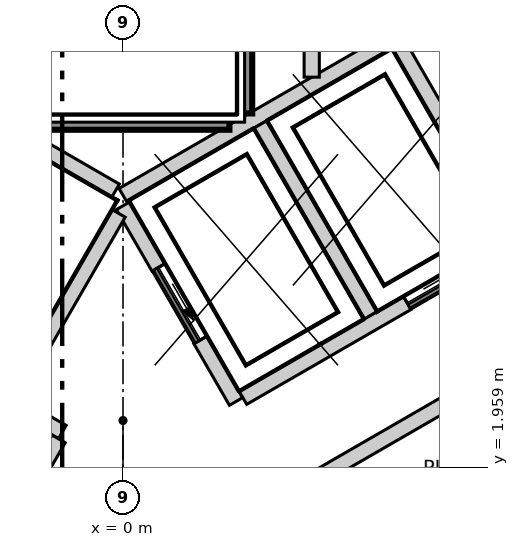
"""IFC4 building model, lengths in metres.
Left out: names, types, materials, properties, quantities, classifications, styles, units other than length and angle.
Written with IfcOpenShell. Run it as: python <this file> out.ifc"""

import sys

from ifc_helpers import new_model, si_unit, direction, frame, frame_2d, origin, place, context, subcontext, project, spatial, polyline, rectangle, outline, extrude, element, fill, save


model = new_model("IFC4")
c1 = context("Model", 3, precision=1e-05, world=origin(), true_north=direction((0.0, 1.0)))
c2 = subcontext(c1, "Body", "Model", "MODEL_VIEW")
j1 = project(units=[si_unit("LENGTHUNIT", "METRE"), si_unit("PLANEANGLEUNIT", "RADIAN")], contexts=[c1])
p1 = place(None, origin())
s1 = spatial("IfcSite", under=j1, at=p1, CompositionType="ELEMENT")
p2 = place(p1, origin())
s2 = spatial("IfcBuilding", under=s1, at=p2, CompositionType="ELEMENT")
p3 = place(p2, frame((0.0, 0.0, 268.3)))
s3 = spatial("IfcBuildingStorey", under=s2, at=p3, CompositionType="ELEMENT", Elevation=268.3)
p4 = place(p3, frame((12.384, -5.15, -0.3), z_axis=(0.0, 0.0, 1.0), x_axis=(-0.500000539815, 0.866025092122, 0.0)))
e1 = element("IfcWall", 1, at=p4, inside=s3, PredefinedType="SHEAR", context=c2, shape_type="SweptSolid", body=[
    extrude(outline(polyline([(-0.173, -0.301), (1.795, -0.301), (3.763, -0.301), (5.731, -0.301), (7.7, -0.301), (9.668, -0.301), (11.636, -0.301), (13.604, -0.3), (15.573, -0.3), (17.541, -0.3), (19.509, -0.3), (21.477, -0.3), (21.131, 0.3), (19.226, 0.3), (17.321, 0.3), (15.415, 0.3), (13.51, 0.3), (11.605, 0.3), (9.699, 0.3), (7.794, 0.3), (5.889, 0.3), (3.984, 0.3), (2.078, 0.3), (0.173, 0.3), (-0.173, -0.301)])), origin(), (0.0, 0.0, 1.0), 3.6),
])
p5 = place(p4, frame((15.627, 0.0, 0.3)))
e2 = element("IfcOpeningElement", 2, at=p5, cuts=e1, PredefinedType="OPENING", context=c2, shape_type="SweptSolid", body=[
    extrude(rectangle(XDim=0.9, YDim=2.1, at=frame_2d((0.45, 1.05))), frame((0.0, 0.31, 0.0), z_axis=(0.0, -1.0, 0.0), x_axis=(1.0, 0.0, 0.0)), (0.0, 0.0, 1.0), 0.621),
])
p6 = place(p4, frame((4.026, 0.0, 0.3)))
e3 = element("IfcOpeningElement", 3, at=p6, cuts=e1, PredefinedType="OPENING", context=c2, shape_type="SweptSolid", body=[
    extrude(rectangle(XDim=0.9, YDim=2.1, at=frame_2d((0.45, 1.05))), frame((0.0, 0.31, 0.0), z_axis=(0.0, -1.0, 0.0), x_axis=(1.0, 0.0, 0.0)), (0.0, 0.0, 1.0), 0.621),
])
p7 = place(p3, frame((26.205, -12.154, 0.0), z_axis=(0.0, 0.0, 1.0), x_axis=(-0.49999909388, 0.866025926932, 0.0)))
e4 = element("IfcWall", 4, at=p7, inside=s3, PredefinedType="ELEMENTEDWALL", context=c2, shape_type="SweptSolid", body=[
    extrude(rectangle(XDim=47.236, YDim=0.2, at=frame_2d((23.618, 0.0))), origin(), (0.0, 0.0, 1.0), 3.3),
])
p8 = place(p7, frame((2.243, 0.0, 0.9)))
e5 = element("IfcOpeningElement", 5, at=p8, cuts=e4, PredefinedType="OPENING", context=c2, shape_type="SweptSolid", body=[
    extrude(rectangle(XDim=3.7, YDim=2.2, at=frame_2d((1.85, 1.1))), frame((0.0, 0.11, 0.0), z_axis=(0.0, -1.0, 0.0), x_axis=(1.0, 0.0, 0.0)), (0.0, 0.0, 1.0), 0.22),
])
p9 = place(p7, frame((7.825, 0.0, 0.9)))
e6 = element("IfcOpeningElement", 6, at=p9, cuts=e4, PredefinedType="OPENING", context=c2, shape_type="SweptSolid", body=[
    extrude(rectangle(XDim=3.7, YDim=2.2, at=frame_2d((1.85, 1.1))), frame((0.0, 0.11, 0.0), z_axis=(0.0, -1.0, 0.0), x_axis=(1.0, 0.0, 0.0)), (0.0, 0.0, 1.0), 0.22),
])
p10 = place(p7, frame((13.406, 0.0, 0.9)))
e7 = element("IfcOpeningElement", 7, at=p10, cuts=e4, PredefinedType="OPENING", context=c2, shape_type="SweptSolid", body=[
    extrude(rectangle(XDim=3.7, YDim=2.2, at=frame_2d((1.85, 1.1))), frame((0.0, 0.11, 0.0), z_axis=(0.0, -1.0, 0.0), x_axis=(1.0, 0.0, 0.0)), (0.0, 0.0, 1.0), 0.22),
])
p11 = place(p7, frame((18.987, 0.0, 0.9)))
e8 = element("IfcOpeningElement", 8, at=p11, cuts=e4, PredefinedType="OPENING", context=c2, shape_type="SweptSolid", body=[
    extrude(rectangle(XDim=3.7, YDim=2.2, at=frame_2d((1.85, 1.1))), frame((0.0, 0.11, 0.0), z_axis=(0.0, -1.0, 0.0), x_axis=(1.0, 0.0, 0.0)), (0.0, 0.0, 1.0), 0.22),
])
p12 = place(p7, frame((24.569, 0.0, 0.9)))
e9 = element("IfcOpeningElement", 9, at=p12, cuts=e4, PredefinedType="OPENING", context=c2, shape_type="SweptSolid", body=[
    extrude(rectangle(XDim=3.7, YDim=2.2, at=frame_2d((1.85, 1.1))), frame((0.0, 0.11, 0.0), z_axis=(0.0, -1.0, 0.0), x_axis=(1.0, 0.0, 0.0)), (0.0, 0.0, 1.0), 0.22),
])
p13 = place(p7, frame((30.15, 0.0, 0.9)))
e10 = element("IfcOpeningElement", 10, at=p13, cuts=e4, PredefinedType="OPENING", context=c2, shape_type="SweptSolid", body=[
    extrude(rectangle(XDim=3.7, YDim=2.2, at=frame_2d((1.85, 1.1))), frame((0.0, 0.11, 0.0), z_axis=(0.0, -1.0, 0.0), x_axis=(1.0, 0.0, 0.0)), (0.0, 0.0, 1.0), 0.22),
])
p14 = place(p7, frame((35.732, 0.0, 0.9)))
e11 = element("IfcOpeningElement", 11, at=p14, cuts=e4, PredefinedType="OPENING", context=c2, shape_type="SweptSolid", body=[
    extrude(rectangle(XDim=3.7, YDim=2.2, at=frame_2d((1.85, 1.1))), frame((0.0, 0.11, 0.0), z_axis=(0.0, -1.0, 0.0), x_axis=(1.0, 0.0, 0.0)), (0.0, 0.0, 1.0), 0.22),
])
p15 = place(p7, frame((41.313, 0.0, 0.9)))
e12 = element("IfcOpeningElement", 12, at=p15, cuts=e4, PredefinedType="OPENING", context=c2, shape_type="SweptSolid", body=[
    extrude(rectangle(XDim=3.7, YDim=2.2, at=frame_2d((1.85, 1.1))), frame((0.0, 0.11, 0.0), z_axis=(0.0, -1.0, 0.0), x_axis=(1.0, 0.0, 0.0)), (0.0, 0.0, 1.0), 0.22),
])
p16 = place(p3, frame((-17.678, -10.12, 0.0), z_axis=(0.0, 0.0, 1.0), x_axis=(0.49998824015, 0.86603219323, 0.0)))
e13 = element("IfcWall", 13, at=p16, inside=s3, PredefinedType="PARTITIONING", context=c2, shape_type="SweptSolid", body=[
    extrude(rectangle(XDim=35.357, YDim=0.15, at=frame_2d((17.678, 0.0))), origin(), (0.0, 0.0, 1.0), 3.3),
])
p17 = place(p16, frame((31.607, 0.0, 0.0)))
e14 = element("IfcOpeningElement", 14, at=p17, cuts=e13, PredefinedType="OPENING", context=c2, shape_type="SweptSolid", body=[
    extrude(rectangle(XDim=1.0, YDim=2.1, at=frame_2d((0.5, 1.05))), frame((0.0, 0.085, 0.0), z_axis=(0.0, -1.0, 0.0), x_axis=(1.0, 0.0, 0.0)), (0.0, 0.0, 1.0), 0.17),
])
p18 = place(p16, frame((19.416, 0.0, 0.0)))
e15 = element("IfcOpeningElement", 15, at=p18, cuts=e13, PredefinedType="OPENING", context=c2, shape_type="SweptSolid", body=[
    extrude(rectangle(XDim=1.0, YDim=2.1, at=frame_2d((0.5, 1.05))), frame((0.0, 0.085, 0.0), z_axis=(0.0, -1.0, 0.0), x_axis=(1.0, 0.0, 0.0)), (0.0, 0.0, 1.0), 0.17),
])
p19 = place(p16, frame((24.916, 0.0, 0.0)))
e16 = element("IfcOpeningElement", 16, at=p19, cuts=e13, PredefinedType="OPENING", context=c2, shape_type="SweptSolid", body=[
    extrude(rectangle(XDim=0.9, YDim=2.1, at=frame_2d((0.45, 1.05))), frame((0.0, 0.085, 0.0), z_axis=(0.0, -1.0, 0.0), x_axis=(1.0, 0.0, 0.0)), (0.0, 0.0, 1.0), 0.17),
])
p20 = place(p16, frame((22.816, 0.0, 0.0)))
e17 = element("IfcOpeningElement", 17, at=p20, cuts=e13, PredefinedType="OPENING", context=c2, shape_type="SweptSolid", body=[
    extrude(rectangle(XDim=0.9, YDim=2.1, at=frame_2d((0.45, 1.05))), frame((0.0, 0.085, 0.0), z_axis=(0.0, -1.0, 0.0), x_axis=(1.0, 0.0, 0.0)), (0.0, 0.0, 1.0), 0.17),
])
p21 = place(p16, frame((14.654, 0.0, 0.0)))
e18 = element("IfcOpeningElement", 18, at=p21, cuts=e13, PredefinedType="OPENING", context=c2, shape_type="SweptSolid", body=[
    extrude(rectangle(XDim=1.0, YDim=2.1, at=frame_2d((0.5, 1.05))), frame((0.0, 0.085, 0.0), z_axis=(0.0, -1.0, 0.0), x_axis=(1.0, 0.0, 0.0)), (0.0, 0.0, 1.0), 0.17),
])
p22 = place(p16, frame((7.672, 0.0, 0.0)))
e19 = element("IfcOpeningElement", 19, at=p22, cuts=e13, PredefinedType="OPENING", context=c2, shape_type="SweptSolid", body=[
    extrude(rectangle(XDim=1.0, YDim=2.1, at=frame_2d((0.5, 1.05))), frame((0.0, 0.085, 0.0), z_axis=(0.0, -1.0, 0.0), x_axis=(1.0, 0.0, 0.0)), (0.0, 0.0, 1.0), 0.17),
])
p23 = place(p16, frame((2.69, 0.0, 0.0)))
e20 = element("IfcOpeningElement", 20, at=p23, cuts=e13, PredefinedType="OPENING", context=c2, shape_type="SweptSolid", body=[
    extrude(rectangle(XDim=1.0, YDim=2.1, at=frame_2d((0.5, 1.05))), frame((0.0, 0.085, 0.0), z_axis=(0.0, -1.0, 0.0), x_axis=(1.0, 0.0, 0.0)), (0.0, 0.0, 1.0), 0.17),
])
p24 = place(p3, frame((0.075, 20.37, 0.0), z_axis=(0.0, 0.0, 1.0), x_axis=(0.499988971979, -0.866031770721, 0.0)))
e21 = element("IfcWall", 21, at=p24, inside=s3, PredefinedType="PARTITIONING", context=c2, shape_type="SweptSolid", body=[
    extrude(rectangle(XDim=35.207, YDim=0.15, at=frame_2d((17.604, 0.0))), origin(), (0.0, 0.0, 1.0), 3.3),
])
p25 = place(p24, frame((31.606, 0.0, 0.0)))
e22 = element("IfcOpeningElement", 22, at=p25, cuts=e21, PredefinedType="OPENING", context=c2, shape_type="SweptSolid", body=[
    extrude(rectangle(XDim=1.0, YDim=2.1, at=frame_2d((0.5, 1.05))), frame((0.0, 0.085, 0.0), z_axis=(0.0, -1.0, 0.0), x_axis=(1.0, 0.0, 0.0)), (0.0, 0.0, 1.0), 0.17),
])
p26 = place(p24, frame((24.316, 0.0, 0.0)))
e23 = element("IfcOpeningElement", 23, at=p26, cuts=e21, PredefinedType="OPENING", context=c2, shape_type="SweptSolid", body=[
    extrude(rectangle(XDim=1.0, YDim=2.1, at=frame_2d((0.5, 1.05))), frame((0.0, 0.085, 0.0), z_axis=(0.0, -1.0, 0.0), x_axis=(1.0, 0.0, 0.0)), (0.0, 0.0, 1.0), 0.17),
])
p27 = place(p24, frame((18.735, 0.0, 0.0)))
e24 = element("IfcOpeningElement", 24, at=p27, cuts=e21, PredefinedType="OPENING", context=c2, shape_type="SweptSolid", body=[
    extrude(rectangle(XDim=1.0, YDim=2.1, at=frame_2d((0.5, 1.05))), frame((0.0, 0.085, 0.0), z_axis=(0.0, -1.0, 0.0), x_axis=(1.0, 0.0, 0.0)), (0.0, 0.0, 1.0), 0.17),
])
p28 = place(p24, frame((8.154, 0.0, 0.0)))
e25 = element("IfcOpeningElement", 25, at=p28, cuts=e21, PredefinedType="OPENING", context=c2, shape_type="SweptSolid", body=[
    extrude(rectangle(XDim=1.0, YDim=2.1, at=frame_2d((0.5, 1.05))), frame((0.0, 0.085, 0.0), z_axis=(0.0, -1.0, 0.0), x_axis=(1.0, 0.0, 0.0)), (0.0, 0.0, 1.0), 0.17),
])
p29 = place(p24, frame((13.754, 0.0, 0.0)))
e26 = element("IfcOpeningElement", 26, at=p29, cuts=e21, PredefinedType="OPENING", context=c2, shape_type="SweptSolid", body=[
    extrude(rectangle(XDim=0.9, YDim=2.1, at=frame_2d((0.45, 1.05))), frame((0.0, 0.085, 0.0), z_axis=(0.0, -1.0, 0.0), x_axis=(1.0, 0.0, 0.0)), (0.0, 0.0, 1.0), 0.17),
])
p30 = place(p24, frame((11.554, 0.0, 0.0)))
e27 = element("IfcOpeningElement", 27, at=p30, cuts=e21, PredefinedType="OPENING", context=c2, shape_type="SweptSolid", body=[
    extrude(rectangle(XDim=0.9, YDim=2.1, at=frame_2d((0.45, 1.05))), frame((0.0, 0.085, 0.0), z_axis=(0.0, -1.0, 0.0), x_axis=(1.0, 0.0, 0.0)), (0.0, 0.0, 1.0), 0.17),
])
p31 = place(p24, frame((2.69, 0.0, 0.0)))
e28 = element("IfcOpeningElement", 28, at=p31, cuts=e21, PredefinedType="OPENING", context=c2, shape_type="SweptSolid", body=[
    extrude(rectangle(XDim=1.0, YDim=2.1, at=frame_2d((0.5, 1.05))), frame((0.0, 0.085, 0.0), z_axis=(0.0, -1.0, 0.0), x_axis=(1.0, 0.0, 0.0)), (0.0, 0.0, 1.0), 0.17),
])
p32 = place(p3, frame((-0.002, 5.541, 0.0), z_axis=(0.0, 0.0, 1.0), x_axis=(0.86600155993, 0.500041296494, 0.0)))
e29 = element("IfcWall", 29, at=p32, inside=s3, PredefinedType="SOLIDWALL", context=c2, shape_type="SweptSolid", body=[
    extrude(rectangle(XDim=4.132, YDim=0.2, at=frame_2d((2.066, 0.0))), origin(), (0.0, 0.0, 1.0), 3.3),
])
p33 = place(p3, frame((0.0, 5.4, 0.0), z_axis=(0.0, 0.0, 1.0), x_axis=(0.500103862429, -0.865965430478, 0.0)))
e30 = element("IfcWall", 30, at=p33, inside=s3, PredefinedType="SOLIDWALL", context=c2, shape_type="SweptSolid", body=[
    extrude(rectangle(XDim=2.973, YDim=0.2, at=frame_2d((1.487, 0.0))), origin(), (0.0, 0.0, 1.0), 3.3),
])
p34 = place(p33, frame((0.937, 0.0, 0.0)))
e31 = element("IfcOpeningElement", 31, at=p34, cuts=e30, PredefinedType="OPENING", context=c2, shape_type="SweptSolid", body=[
    extrude(rectangle(XDim=1.1, YDim=2.1, at=frame_2d((0.55, 1.05))), frame((0.0, 0.11, 0.0), z_axis=(0.0, -1.0, 0.0), x_axis=(1.0, 0.0, 0.0)), (0.0, 0.0, 1.0), 0.22),
])
p35 = place(p3, frame((1.578, 2.874, 0.0), z_axis=(0.0, 0.0, 1.0), x_axis=(0.866045911672, 0.499964477614, 0.0)))
e32 = element("IfcWall", 32, at=p35, inside=s3, PredefinedType="SOLIDWALL", context=c2, shape_type="SweptSolid", body=[
    extrude(rectangle(XDim=5.327, YDim=0.2, at=frame_2d((2.663, 0.0))), origin(), (0.0, 0.0, 1.0), 3.3),
])
p36 = place(p35, frame((2.496, 0.0, 0.0)))
e33 = element("IfcOpeningElement", 33, at=p36, cuts=e32, PredefinedType="OPENING", context=c2, shape_type="SweptSolid", body=[
    extrude(rectangle(XDim=1.1, YDim=2.1, at=frame_2d((0.55, 1.05))), frame((0.0, 0.11, 0.0), z_axis=(0.0, -1.0, 0.0), x_axis=(1.0, 0.0, 0.0)), (0.0, 0.0, 1.0), 0.22),
])
for number, where, z_axis, x_axis in (
    (34, (1.807, 6.47, 0.0), (0.0, 0.0, 1.0), (0.5, -0.866, 0.0)),
    (35, (3.626, 7.52, 0.0), (0.0, 0.0, 1.0), (0.5, -0.866, 0.0)),
):
    element("IfcWall", number, at=place(p3, frame(where, z_axis=z_axis, x_axis=x_axis)), inside=s3, PredefinedType="SOLIDWALL", context=c2, shape_type="SweptSolid", body=[
        extrude(rectangle(XDim=2.9, YDim=0.2, at=frame_2d((1.45, 0.0))), origin(), (0.0, 0.0, 1.0), 3.3),
    ])
p37 = place(p3, frame((2.275, 1.66, 0.0), z_axis=(0.0, 0.0, 1.0), x_axis=(0.866013608182, 0.500020430026, 0.0)))
e36 = element("IfcWall", 36, at=p37, inside=s3, PredefinedType="SOLIDWALL", context=c2, shape_type="SweptSolid", body=[
    extrude(rectangle(XDim=4.35, YDim=0.2, at=frame_2d((2.175, 0.0))), origin(), (0.0, 0.0, 1.0), 3.3),
])
p38 = place(p3, frame((-1.488, 2.822, 0.0), z_axis=(0.0, 0.0, 1.0), x_axis=(0.866236612152, -0.499633997809, 0.0)))
e37 = element("IfcWall", 37, at=p38, inside=s3, PredefinedType="SOLIDWALL", context=c2, shape_type="SweptSolid", body=[
    extrude(rectangle(XDim=0.796, YDim=0.2, at=frame_2d((0.398, 0.0))), origin(), (0.0, 0.0, 1.0), 3.3),
])
p39 = place(p3, frame((-2.444, -0.433, 0.0), z_axis=(0.0, 0.0, 1.0), x_axis=(0.500035624827, 0.866004834804, 0.0)))
e38 = element("IfcWall", 38, at=p39, inside=s3, PredefinedType="SOLIDWALL", context=c2, shape_type="SweptSolid", body=[
    extrude(rectangle(XDim=3.194, YDim=0.2, at=frame_2d((1.597, 0.0))), origin(), (0.0, 0.0, 1.0), 3.3),
])
p40 = place(p3, frame((-1.67, 6.507, 0.0), z_axis=(0.0, 0.0, 1.0), x_axis=(0.865941441609, -0.500145398563, 0.0)))
e39 = element("IfcWall", 39, at=p40, inside=s3, PredefinedType="SOLIDWALL", context=c2, shape_type="SweptSolid", body=[
    extrude(rectangle(XDim=1.815, YDim=0.2, at=frame_2d((0.908, 0.0))), origin(), (0.0, 0.0, 1.0), 3.3),
])
p41 = place(p3, frame((-1.438, 2.909, 0.0), z_axis=(0.0, 0.0, 1.0), x_axis=(0.499829630636, 0.866123744241, 0.0)))
e40 = element("IfcWall", 40, at=p41, inside=s3, PredefinedType="SOLIDWALL", context=c2, shape_type="SweptSolid", body=[
    extrude(rectangle(XDim=2.761, YDim=0.2, at=frame_2d((1.38, 0.0))), origin(), (0.0, 0.0, 1.0), 3.3),
])
p42 = place(p3, frame((2.483, 7.092, 0.0), z_axis=(0.0, 0.0, 1.0), x_axis=(0.0, 1.0, 0.0)))
e41 = element("IfcWall", 41, at=p42, inside=s3, PredefinedType="SOLIDWALL", context=c2, shape_type="SweptSolid", body=[
    extrude(rectangle(XDim=4.867, YDim=0.2, at=frame_2d((2.434, 0.0))), origin(), (0.0, 0.0, 1.0), 3.3),
])
p43 = place(p3, frame((1.6, 6.615, 0.0), z_axis=(0.0, 0.0, 1.0), x_axis=(0.0, 1.0, 0.0)))
e42 = element("IfcWall", 42, at=p43, inside=s3, PredefinedType="SOLIDWALL", context=c2, shape_type="SweptSolid", body=[
    extrude(rectangle(XDim=6.665, YDim=0.2, at=frame_2d((3.333, 0.0))), origin(), (0.0, 0.0, 1.0), 3.3),
])
p44 = place(p3, frame((-1.4, 6.5, 0.0), z_axis=(0.0, 0.0, 1.0), x_axis=(1.0, 0.0, 0.0)))
e43 = element("IfcWall", 43, at=p44, inside=s3, PredefinedType="SOLIDWALL", context=c2, shape_type="SweptSolid", body=[
    extrude(rectangle(XDim=2.8, YDim=0.2, at=frame_2d((1.4, 0.0))), origin(), (0.0, 0.0, 1.0), 3.3),
])
p45 = place(p34, origin())
e44 = element("IfcDoor", 44, at=p45, inside=s3, OperationType="SLIDING_TO_LEFT", PredefinedType="DOOR", context=c2, shape_type="SweptSolid", body=[
    extrude(rectangle(XDim=1.1, YDim=2.1, at=frame_2d((0.55, 1.05))), frame((0.0, 0.025, 0.0), z_axis=(0.0, -1.0, 0.0), x_axis=(1.0, 0.0, 0.0)), (0.0, 0.0, 1.0), 0.05),
])
fill(e31, e44)
p46 = place(p36, origin())
e45 = element("IfcDoor", 45, at=p46, inside=s3, OperationType="SLIDING_TO_LEFT", PredefinedType="DOOR", context=c2, shape_type="SweptSolid", body=[
    extrude(rectangle(XDim=1.1, YDim=2.1, at=frame_2d((0.55, 1.05))), frame((0.0, 0.025, 0.0), z_axis=(0.0, -1.0, 0.0), x_axis=(1.0, 0.0, 0.0)), (0.0, 0.0, 1.0), 0.05),
])
fill(e33, e45)
save(model, sys.argv[1])
